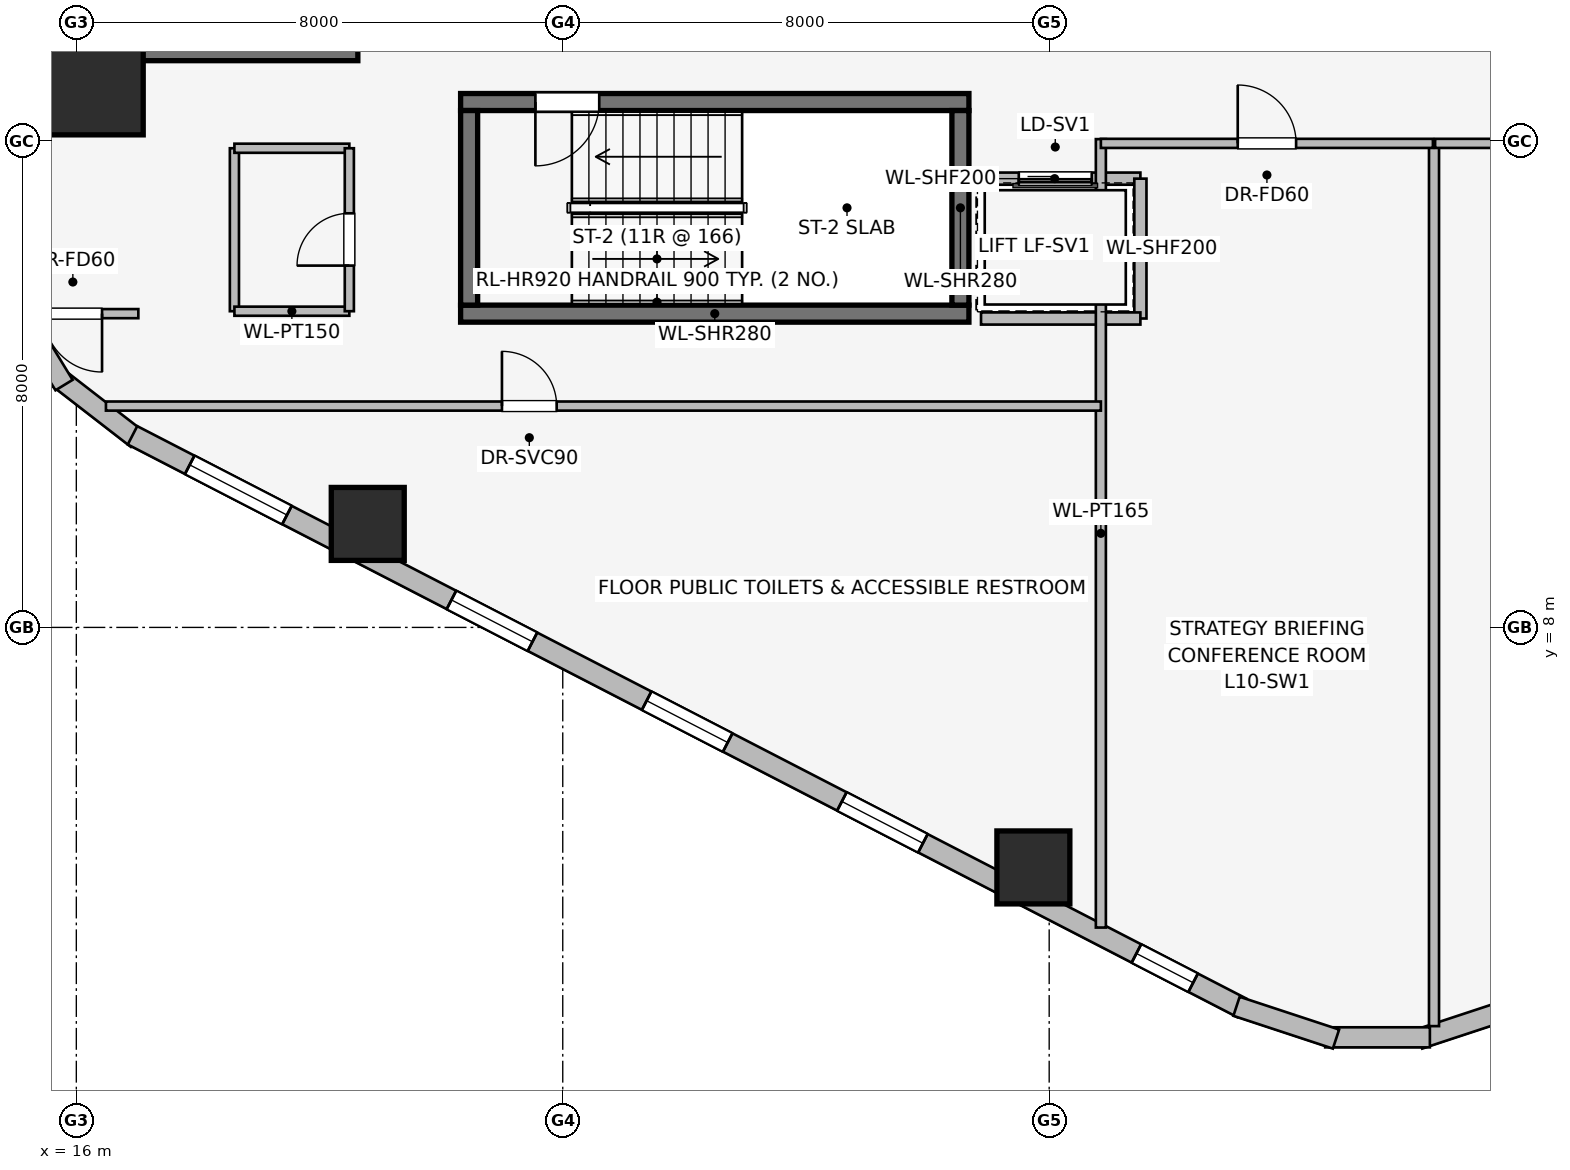
"""IFC4 building model, lengths in metres.
Left out: names, types, materials, properties, quantities, classifications, styles, units other than length and angle.
Written with IfcOpenShell. Run it as: python <this file> out.ifc"""

import sys

from ifc_helpers import new_model, si_unit, direction, frame, frame_2d, origin, origin_2d, place, context, subcontext, project, spatial, rectangle, extrude, element, fill, save


model = new_model("IFC4")
c1 = context("Model", 3, precision=1e-05, world=origin(), true_north=direction((0.0, 1.0)))
c2 = subcontext(c1, "Body", "Model", "MODEL_VIEW")
j1 = project(units=[si_unit("LENGTHUNIT", "METRE"), si_unit("PLANEANGLEUNIT", "RADIAN")], contexts=[c1])
p1 = place(None, origin())
s1 = spatial("IfcSite", under=j1, at=p1, CompositionType="ELEMENT")
p2 = place(p1, origin())
s2 = spatial("IfcBuilding", under=s1, at=p2, CompositionType="ELEMENT")
p3 = place(p2, frame((0.0, 0.0, 41.6)))
s3 = spatial("IfcBuildingStorey", under=s2, at=p3, CompositionType="ELEMENT", Elevation=41.6)
p4 = place(p3, frame((16.87, 17.46, 0.0), z_axis=(0.0, 0.0, 1.0), x_axis=(1.0, 0.0, 0.0)))
e1 = element("IfcWall", 1, at=p4, inside=s3, PredefinedType="SHEAR", context=c2, shape_type="SweptSolid", body=[
    extrude(rectangle(XDim=3.76, YDim=0.28, at=frame_2d((1.88, 0.0))), origin(), (0.0, 0.0, 1.0), 3.65),
])
p5 = place(p3, frame((22.32, 13.16, 0.0), z_axis=(0.0, 0.0, 1.0), x_axis=(1.0, 0.0, 0.0)))
e2 = element("IfcWall", 2, at=p5, inside=s3, PredefinedType="SHEAR", context=c2, shape_type="SweptSolid", body=[
    extrude(rectangle(XDim=8.36, YDim=0.28, at=frame_2d((4.18, 0.0))), origin(), (0.0, 0.0, 1.0), 3.65),
])
p6 = place(p3, frame((30.68, 16.64, 0.0), z_axis=(0.0, 0.0, 1.0), x_axis=(-1.0, 0.0, 0.0)))
e3 = element("IfcWall", 3, at=p6, inside=s3, PredefinedType="SHEAR", context=c2, shape_type="SweptSolid", body=[
    extrude(rectangle(XDim=8.36, YDim=0.28, at=frame_2d((4.18, 0.0))), origin(), (0.0, 0.0, 1.0), 3.65),
])
p7 = place(p6, frame((6.08, 0.0, 0.0)))
e4 = element("IfcOpeningElement", 4, at=p7, cuts=e3, PredefinedType="OPENING", context=c2, shape_type="SweptSolid", body=[
    extrude(rectangle(XDim=1.05, YDim=2.0, at=frame_2d((0.525, 1.0))), frame((0.0, 0.15, 0.0), z_axis=(0.0, -1.0, 0.0), x_axis=(1.0, 0.0, 0.0)), (0.0, 0.0, 1.0), 0.3),
])
for number, where, z_axis, x_axis in (
    (5, (22.46, 16.5, 0.0), (0.0, 0.0, 1.0), (0.0, -1.0, 0.0)),
    (6, (30.54, 13.3, 0.0), (0.0, 0.0, 1.0), (0.0, 1.0, 0.0)),
):
    element("IfcWall", number, at=place(p3, frame(where, z_axis=z_axis, x_axis=x_axis)), inside=s3, PredefinedType="SHEAR", context=c2, shape_type="SweptSolid", body=[
        extrude(rectangle(XDim=3.2, YDim=0.28, at=frame_2d((1.6, 0.0))), origin(), (0.0, 0.0, 1.0), 3.65),
    ])
p8 = place(p3, frame((16.3, 16.9, 0.0), z_axis=(0.0, 0.0, 1.0), x_axis=(1.0, 0.0, 0.0)))
e7 = element("IfcColumn", 7, at=p8, inside=s3, PredefinedType="COLUMN", context=c2, shape_type="SweptSolid", body=[
    extrude(rectangle(XDim=1.6, YDim=1.6, at=origin_2d()), origin(), (0.0, 0.0, 1.0), 3.65),
])
for number, where, z_axis, x_axis in (
    (8, (20.793, 9.702, 0.0), (0.0, 0.0, 1.0), (1.0, 0.0, 0.0)),
    (9, (31.74, 4.053, 0.0), (0.0, 0.0, 1.0), (1.0, 0.0, 0.0)),
):
    element("IfcColumn", number, at=place(p3, frame(where, z_axis=z_axis, x_axis=x_axis)), inside=s3, PredefinedType="COLUMN", context=c2, shape_type="SweptSolid", body=[
        extrude(rectangle(XDim=1.2, YDim=1.2, at=origin_2d()), origin(), (0.0, 0.0, 1.0), 3.65),
    ])
p9 = place(p3, frame((16.998, 11.099, 0.0), z_axis=(0.0, 0.0, 1.0), x_axis=(-0.790691856293, 0.61221433207, 0.0)))
e10 = element("IfcWall", 10, at=p9, inside=s3, PredefinedType="STANDARD", context=c2, shape_type="SweptSolid", body=[
    extrude(rectangle(XDim=1.676, YDim=0.33, at=frame_2d((0.838, 0.0))), origin(), (0.0, 0.0, 1.0), 3.39),
])
p10 = place(p3, frame((15.798, 11.985, 0.0), z_axis=(0.0, 0.0, 1.0), x_axis=(-0.520584129191, 0.853810379671, 0.0)))
e11 = element("IfcWall", 11, at=p10, inside=s3, PredefinedType="STANDARD", context=c2, shape_type="SweptSolid", body=[
    extrude(rectangle(XDim=1.677, YDim=0.33, at=frame_2d((0.838, 0.0))), origin(), (0.0, 0.0, 1.0), 3.39),
])
p11 = place(p3, frame((35.169, 1.743, 0.0), z_axis=(0.0, 0.0, 1.0), x_axis=(-0.888634413993, 0.458616264721, 0.0)))
e12 = element("IfcWall", 12, at=p11, inside=s3, PredefinedType="STANDARD", context=c2, shape_type="SweptSolid", body=[
    extrude(rectangle(XDim=20.531, YDim=0.34, at=frame_2d((10.266, 0.0))), origin(), (0.0, 0.0, 1.0), 2.684),
])
p12 = place(p11, frame((0.902, 0.0, 0.75)))
e13 = element("IfcOpeningElement", 13, at=p12, cuts=e12, PredefinedType="OPENING", context=c2, shape_type="SweptSolid", body=[
    extrude(rectangle(XDim=1.05, YDim=1.4, at=frame_2d((0.525, 0.7))), frame((0.0, 0.18, 0.0), z_axis=(0.0, -1.0, 0.0), x_axis=(1.0, 0.0, 0.0)), (0.0, 0.0, 1.0), 0.36),
])
p13 = place(p11, frame((5.903, 0.0, 0.75)))
e14 = element("IfcOpeningElement", 14, at=p13, cuts=e12, PredefinedType="OPENING", context=c2, shape_type="SweptSolid", body=[
    extrude(rectangle(XDim=1.5, YDim=1.5, at=frame_2d((0.75, 0.75))), frame((0.0, 0.18, 0.0), z_axis=(0.0, -1.0, 0.0), x_axis=(1.0, 0.0, 0.0)), (0.0, 0.0, 1.0), 0.36),
])
p14 = place(p11, frame((9.516, 0.0, 0.75)))
e15 = element("IfcOpeningElement", 15, at=p14, cuts=e12, PredefinedType="OPENING", context=c2, shape_type="SweptSolid", body=[
    extrude(rectangle(XDim=1.5, YDim=1.5, at=frame_2d((0.75, 0.75))), frame((0.0, 0.18, 0.0), z_axis=(0.0, -1.0, 0.0), x_axis=(1.0, 0.0, 0.0)), (0.0, 0.0, 1.0), 0.36),
])
p15 = place(p11, frame((13.129, 0.0, 0.75)))
e16 = element("IfcOpeningElement", 16, at=p15, cuts=e12, PredefinedType="OPENING", context=c2, shape_type="SweptSolid", body=[
    extrude(rectangle(XDim=1.5, YDim=1.5, at=frame_2d((0.75, 0.75))), frame((0.0, 0.18, 0.0), z_axis=(0.0, -1.0, 0.0), x_axis=(1.0, 0.0, 0.0)), (0.0, 0.0, 1.0), 0.36),
])
p16 = place(p11, frame((17.673, 0.0, 0.75)))
e17 = element("IfcOpeningElement", 17, at=p16, cuts=e12, PredefinedType="OPENING", context=c2, shape_type="SweptSolid", body=[
    extrude(rectangle(XDim=1.8, YDim=1.5, at=frame_2d((0.9, 0.75))), frame((0.0, 0.18, 0.0), z_axis=(0.0, -1.0, 0.0), x_axis=(1.0, 0.0, 0.0)), (0.0, 0.0, 1.0), 0.36),
])
p17 = place(p3, frame((39.719, 1.769, 0.0), z_axis=(0.0, 0.0, 1.0), x_axis=(-0.94976901097, -0.312951794691, 0.0)))
e18 = element("IfcWall", 18, at=p17, inside=s3, PredefinedType="STANDARD", context=c2, shape_type="SweptSolid", body=[
    extrude(rectangle(XDim=1.722, YDim=0.33, at=frame_2d((0.861, 0.0))), origin(), (0.0, 0.0, 1.0), 3.39),
])
p18 = place(p3, frame((38.261, 1.259, 0.0), z_axis=(0.0, 0.0, 1.0), x_axis=(-1.0, 0.0, 0.0)))
e19 = element("IfcWall", 19, at=p18, inside=s3, PredefinedType="STANDARD", context=c2, shape_type="SweptSolid", body=[
    extrude(rectangle(XDim=1.722, YDim=0.33, at=frame_2d((0.861, 0.0))), origin(), (0.0, 0.0, 1.0), 3.39),
])
p19 = place(p3, frame((36.717, 1.23, 0.0), z_axis=(0.0, 0.0, 1.0), x_axis=(-0.94976901097, 0.312951794691, 0.0)))
e20 = element("IfcWall", 20, at=p19, inside=s3, PredefinedType="STANDARD", context=c2, shape_type="SweptSolid", body=[
    extrude(rectangle(XDim=1.722, YDim=0.33, at=frame_2d((0.861, 0.0))), origin(), (0.0, 0.0, 1.0), 3.39),
])
p20 = place(p3, frame((33.5, 15.38, 0.0), z_axis=(0.0, 0.0, 1.0), x_axis=(-1.0, 0.0, 0.0)))
e21 = element("IfcWall", 21, at=p20, inside=s3, PredefinedType="PARTITIONING", context=c2, shape_type="SweptSolid", body=[
    extrude(rectangle(XDim=2.82, YDim=0.2, at=frame_2d((1.41, 0.0))), origin(), (0.0, 0.0, 1.0), 3.39),
])
p21 = place(p20, frame((0.8, 0.0, 0.0)))
e22 = element("IfcOpeningElement", 22, at=p21, cuts=e21, PredefinedType="OPENING", context=c2, shape_type="SweptSolid", body=[
    extrude(rectangle(XDim=1.2, YDim=2.2, at=frame_2d((0.6, 1.1))), frame((0.0, 0.11, 0.0), z_axis=(0.0, -1.0, 0.0), x_axis=(1.0, 0.0, 0.0)), (0.0, 0.0, 1.0), 0.22),
])
p22 = place(p3, frame((33.5, 13.08, 0.0), z_axis=(0.0, 0.0, 1.0), x_axis=(0.0, 1.0, 0.0)))
e23 = element("IfcWall", 23, at=p22, inside=s3, PredefinedType="PARTITIONING", context=c2, shape_type="SweptSolid", body=[
    extrude(rectangle(XDim=2.3, YDim=0.2, at=frame_2d((1.15, 0.0))), origin(), (0.0, 0.0, 1.0), 3.39),
])
p23 = place(p3, frame((30.879, 13.08, 0.0), z_axis=(0.0, 0.0, 1.0), x_axis=(1.0, 0.0, 0.0)))
e24 = element("IfcWall", 24, at=p23, inside=s3, PredefinedType="PARTITIONING", context=c2, shape_type="SweptSolid", body=[
    extrude(rectangle(XDim=2.621, YDim=0.2, at=frame_2d((1.311, 0.0))), origin(), (0.0, 0.0, 1.0), 3.39),
])
p24 = place(p3, frame((18.6, 15.88, 0.0), z_axis=(0.0, 0.0, 1.0), x_axis=(0.0, -1.0, 0.0)))
e25 = element("IfcWall", 25, at=p24, inside=s3, PredefinedType="PARTITIONING", context=c2, shape_type="SweptSolid", body=[
    extrude(rectangle(XDim=2.68, YDim=0.15, at=frame_2d((1.34, 0.0))), origin(), (0.0, 0.0, 1.0), 3.39),
])
for number, where, z_axis, x_axis in (
    (26, (18.6, 13.2, 0.0), (0.0, 0.0, 1.0), (1.0, 0.0, 0.0)),
    (27, (18.6, 15.88, 0.0), (0.0, 0.0, 1.0), (1.0, 0.0, 0.0)),
):
    element("IfcWall", number, at=place(p3, frame(where, z_axis=z_axis, x_axis=x_axis)), inside=s3, PredefinedType="PARTITIONING", context=c2, shape_type="SweptSolid", body=[
        extrude(rectangle(XDim=1.89, YDim=0.15, at=frame_2d((0.945, 0.0))), origin(), (0.0, 0.0, 1.0), 3.39),
    ])
p25 = place(p3, frame((20.49, 13.2, 0.0), z_axis=(0.0, 0.0, 1.0), x_axis=(0.0, 1.0, 0.0)))
e28 = element("IfcWall", 28, at=p25, inside=s3, PredefinedType="PARTITIONING", context=c2, shape_type="SweptSolid", body=[
    extrude(rectangle(XDim=2.68, YDim=0.15, at=frame_2d((1.34, 0.0))), origin(), (0.0, 0.0, 1.0), 3.39),
])
p26 = place(p25, frame((0.75, 0.0, 0.0)))
e29 = element("IfcOpeningElement", 29, at=p26, cuts=e28, PredefinedType="OPENING", context=c2, shape_type="SweptSolid", body=[
    extrude(rectangle(XDim=0.86, YDim=2.0, at=frame_2d((0.43, 1.0))), frame((0.0, 0.085, 0.0), z_axis=(0.0, -1.0, 0.0), x_axis=(1.0, 0.0, 0.0)), (0.0, 0.0, 1.0), 0.17),
])
p27 = place(p3, frame((32.85, 3.064, 0.0), z_axis=(0.0, 0.0, 1.0), x_axis=(0.0, 1.0, 0.0)))
e30 = element("IfcWall", 30, at=p27, inside=s3, PredefinedType="PARTITIONING", context=c2, shape_type="SweptSolid", body=[
    extrude(rectangle(XDim=12.966, YDim=0.165, at=frame_2d((6.483, 0.0))), origin(), (0.0, 0.0, 1.0), 3.39),
])
p28 = place(p3, frame((16.487, 11.64, 0.0), z_axis=(0.0, 0.0, 1.0), x_axis=(1.0, 0.0, 0.0)))
e31 = element("IfcWall", 31, at=p28, inside=s3, PredefinedType="PARTITIONING", context=c2, shape_type="SweptSolid", body=[
    extrude(rectangle(XDim=16.363, YDim=0.15, at=frame_2d((8.182, 0.0))), origin(), (0.0, 0.0, 1.0), 3.39),
])
p29 = place(p28, frame((6.513, 0.0, 0.0)))
e32 = element("IfcOpeningElement", 32, at=p29, cuts=e31, PredefinedType="OPENING", context=c2, shape_type="SweptSolid", body=[
    extrude(rectangle(XDim=0.9, YDim=2.0, at=frame_2d((0.45, 1.0))), frame((0.0, 0.085, 0.0), z_axis=(0.0, -1.0, 0.0), x_axis=(1.0, 0.0, 0.0)), (0.0, 0.0, 1.0), 0.17),
])
p30 = place(p3, frame((17.02, 13.16, 0.0), z_axis=(0.0, 0.0, 1.0), x_axis=(-1.0, 0.0, 0.0)))
e33 = element("IfcWall", 33, at=p30, inside=s3, PredefinedType="PARTITIONING", context=c2, shape_type="SweptSolid", body=[
    extrude(rectangle(XDim=2.12, YDim=0.15, at=frame_2d((1.06, 0.0))), origin(), (0.0, 0.0, 1.0), 3.39),
])
p31 = place(p30, frame((0.597, 0.0, 0.0)))
e34 = element("IfcOpeningElement", 34, at=p31, cuts=e33, PredefinedType="OPENING", context=c2, shape_type="SweptSolid", body=[
    extrude(rectangle(XDim=0.96, YDim=2.0, at=frame_2d((0.48, 1.0))), frame((0.0, 0.085, 0.0), z_axis=(0.0, -1.0, 0.0), x_axis=(1.0, 0.0, 0.0)), (0.0, 0.0, 1.0), 0.17),
])
p32 = place(p3, frame((38.329, 1.443, 0.0), z_axis=(0.0, 0.0, 1.0), x_axis=(0.0, 1.0, 0.0)))
e35 = element("IfcWall", 35, at=p32, inside=s3, PredefinedType="PARTITIONING", context=c2, shape_type="SweptSolid", body=[
    extrude(rectangle(XDim=14.487, YDim=0.165, at=frame_2d((7.243, 0.0))), origin(), (0.0, 0.0, 1.0), 3.39),
])
p33 = place(p3, frame((32.85, 15.96, 0.0), z_axis=(0.0, 0.0, 1.0), x_axis=(1.0, 0.0, 0.0)))
e36 = element("IfcWall", 36, at=p33, inside=s3, PredefinedType="PARTITIONING", context=c2, shape_type="SweptSolid", body=[
    extrude(rectangle(XDim=5.461, YDim=0.15, at=frame_2d((2.73, 0.0))), origin(), (0.0, 0.0, 1.0), 3.39),
])
p34 = place(p33, frame((2.251, 0.0, 0.0)))
e37 = element("IfcOpeningElement", 37, at=p34, cuts=e36, PredefinedType="OPENING", context=c2, shape_type="SweptSolid", body=[
    extrude(rectangle(XDim=0.96, YDim=2.0, at=frame_2d((0.48, 1.0))), frame((0.0, 0.085, 0.0), z_axis=(0.0, -1.0, 0.0), x_axis=(1.0, 0.0, 0.0)), (0.0, 0.0, 1.0), 0.17),
])
p35 = place(p3, frame((38.347, 15.96, 0.0), z_axis=(0.0, 0.0, 1.0), x_axis=(1.0, 0.0, 0.0)))
e38 = element("IfcWall", 38, at=p35, inside=s3, PredefinedType="PARTITIONING", context=c2, shape_type="SweptSolid", body=[
    extrude(rectangle(XDim=5.913, YDim=0.15, at=frame_2d((2.957, 0.0))), origin(), (0.0, 0.0, 1.0), 3.39),
])
p36 = place(p35, frame((2.477, 0.0, 0.0)))
e39 = element("IfcOpeningElement", 39, at=p36, cuts=e38, PredefinedType="OPENING", context=c2, shape_type="SweptSolid", body=[
    extrude(rectangle(XDim=0.96, YDim=2.0, at=frame_2d((0.48, 1.0))), frame((0.0, 0.085, 0.0), z_axis=(0.0, -1.0, 0.0), x_axis=(1.0, 0.0, 0.0)), (0.0, 0.0, 1.0), 0.17),
])
p37 = place(p12, origin())
e40 = element("IfcWindow", 40, at=p37, inside=s3, PartitioningType="SINGLE_PANEL", PredefinedType="WINDOW", context=c2, shape_type="SweptSolid", body=[
    extrude(rectangle(XDim=1.05, YDim=1.4, at=frame_2d((0.525, 0.7))), frame((0.0, 0.03, 0.0), z_axis=(0.0, -1.0, 0.0), x_axis=(1.0, 0.0, 0.0)), (0.0, 0.0, 1.0), 0.06),
])
fill(e13, e40)
p38 = place(p13, origin())
e41 = element("IfcWindow", 41, at=p38, inside=s3, PartitioningType="SINGLE_PANEL", PredefinedType="WINDOW", context=c2, shape_type="SweptSolid", body=[
    extrude(rectangle(XDim=1.5, YDim=1.5, at=frame_2d((0.75, 0.75))), frame((0.0, 0.03, 0.0), z_axis=(0.0, -1.0, 0.0), x_axis=(1.0, 0.0, 0.0)), (0.0, 0.0, 1.0), 0.06),
])
fill(e14, e41)
p39 = place(p14, origin())
e42 = element("IfcWindow", 42, at=p39, inside=s3, PartitioningType="SINGLE_PANEL", PredefinedType="WINDOW", context=c2, shape_type="SweptSolid", body=[
    extrude(rectangle(XDim=1.5, YDim=1.5, at=frame_2d((0.75, 0.75))), frame((0.0, 0.03, 0.0), z_axis=(0.0, -1.0, 0.0), x_axis=(1.0, 0.0, 0.0)), (0.0, 0.0, 1.0), 0.06),
])
fill(e15, e42)
p40 = place(p15, origin())
e43 = element("IfcWindow", 43, at=p40, inside=s3, PartitioningType="SINGLE_PANEL", PredefinedType="WINDOW", context=c2, shape_type="SweptSolid", body=[
    extrude(rectangle(XDim=1.5, YDim=1.5, at=frame_2d((0.75, 0.75))), frame((0.0, 0.03, 0.0), z_axis=(0.0, -1.0, 0.0), x_axis=(1.0, 0.0, 0.0)), (0.0, 0.0, 1.0), 0.06),
])
fill(e16, e43)
p41 = place(p16, origin())
e44 = element("IfcWindow", 44, at=p41, inside=s3, PartitioningType="SINGLE_PANEL", PredefinedType="WINDOW", context=c2, shape_type="SweptSolid", body=[
    extrude(rectangle(XDim=1.8, YDim=1.5, at=frame_2d((0.9, 0.75))), frame((0.0, 0.03, 0.0), z_axis=(0.0, -1.0, 0.0), x_axis=(1.0, 0.0, 0.0)), (0.0, 0.0, 1.0), 0.06),
])
fill(e17, e44)
p42 = place(p7, origin())
e45 = element("IfcDoor", 45, at=p42, inside=s3, OperationType="SINGLE_SWING_RIGHT", PredefinedType="DOOR", context=c2, shape_type="SweptSolid", body=[
    extrude(rectangle(XDim=1.05, YDim=2.0, at=frame_2d((0.525, 1.0))), frame((0.0, 0.025, 0.0), z_axis=(0.0, -1.0, 0.0), x_axis=(1.0, 0.0, 0.0)), (0.0, 0.0, 1.0), 0.05),
])
fill(e4, e45)
p43 = place(p21, origin())
e46 = element("IfcDoor", 46, at=p43, inside=s3, OperationType="SLIDING_TO_RIGHT", PredefinedType="DOOR", context=c2, shape_type="SweptSolid", body=[
    extrude(rectangle(XDim=1.2, YDim=2.2, at=frame_2d((0.6, 1.1))), frame((0.0, 0.025, 0.0), z_axis=(0.0, -1.0, 0.0), x_axis=(1.0, 0.0, 0.0)), (0.0, 0.0, 1.0), 0.05),
])
fill(e22, e46)
p44 = place(p26, origin())
e47 = element("IfcDoor", 47, at=p44, inside=s3, OperationType="SINGLE_SWING_LEFT", PredefinedType="DOOR", context=c2, shape_type="SweptSolid", body=[
    extrude(rectangle(XDim=0.86, YDim=2.0, at=frame_2d((0.43, 1.0))), frame((0.0, 0.025, 0.0), z_axis=(0.0, -1.0, 0.0), x_axis=(1.0, 0.0, 0.0)), (0.0, 0.0, 1.0), 0.05),
])
fill(e29, e47)
p45 = place(p29, origin())
e48 = element("IfcDoor", 48, at=p45, inside=s3, OperationType="SINGLE_SWING_LEFT", PredefinedType="DOOR", context=c2, shape_type="SweptSolid", body=[
    extrude(rectangle(XDim=0.9, YDim=2.0, at=frame_2d((0.45, 1.0))), frame((0.0, 0.025, 0.0), z_axis=(0.0, -1.0, 0.0), x_axis=(1.0, 0.0, 0.0)), (0.0, 0.0, 1.0), 0.05),
])
fill(e32, e48)
p46 = place(p31, origin())
e49 = element("IfcDoor", 49, at=p46, inside=s3, OperationType="SINGLE_SWING_LEFT", PredefinedType="DOOR", context=c2, shape_type="SweptSolid", body=[
    extrude(rectangle(XDim=0.96, YDim=2.0, at=frame_2d((0.48, 1.0))), frame((0.0, 0.025, 0.0), z_axis=(0.0, -1.0, 0.0), x_axis=(1.0, 0.0, 0.0)), (0.0, 0.0, 1.0), 0.05),
])
fill(e34, e49)
p47 = place(p34, origin())
e50 = element("IfcDoor", 50, at=p47, inside=s3, OperationType="SINGLE_SWING_LEFT", PredefinedType="DOOR", context=c2, shape_type="SweptSolid", body=[
    extrude(rectangle(XDim=0.96, YDim=2.0, at=frame_2d((0.48, 1.0))), frame((0.0, 0.025, 0.0), z_axis=(0.0, -1.0, 0.0), x_axis=(1.0, 0.0, 0.0)), (0.0, 0.0, 1.0), 0.05),
])
fill(e37, e50)
save(model, sys.argv[1])
